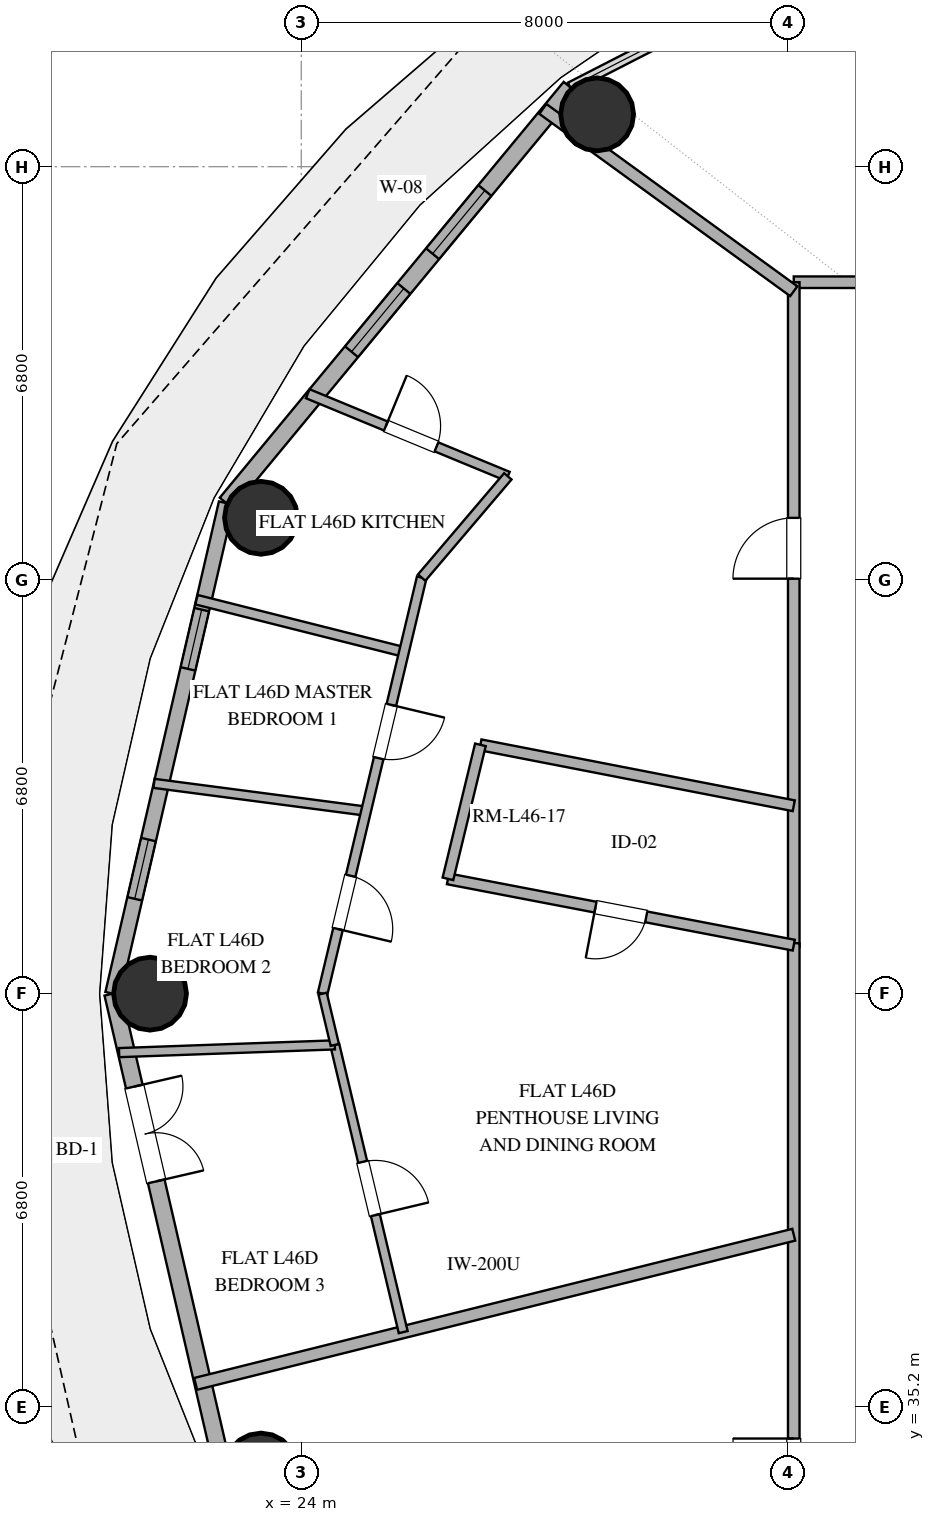
"""IFC4 building model, lengths in metres.
Left out: names, types, materials, properties, quantities, classifications, styles, units other than length and angle.
Written with IfcOpenShell. Run it as: python <this file> out.ifc"""

import sys

from ifc_helpers import new_model, si_unit, direction, frame, frame_2d, origin, origin_2d, place, context, subcontext, project, spatial, rectangle, hollow_circle, extrude, element, fill, save


model = new_model("IFC4")
c1 = context("Model", 3, precision=1e-05, world=origin(), true_north=direction((0.0, 1.0)))
c2 = subcontext(c1, "Body", "Model", "MODEL_VIEW")
j1 = project(units=[si_unit("LENGTHUNIT", "METRE"), si_unit("PLANEANGLEUNIT", "RADIAN")], contexts=[c1])
p1 = place(None, origin())
s1 = spatial("IfcSite", under=j1, at=p1, CompositionType="ELEMENT")
p2 = place(p1, origin())
s2 = spatial("IfcBuilding", under=s1, at=p2, CompositionType="ELEMENT")
p3 = place(p2, frame((0.0, 0.0, 183.0)))
s3 = spatial("IfcBuildingStorey", under=s2, at=p3, CompositionType="ELEMENT", Elevation=183.0)
for number, where, z_axis, x_axis in (
    (1, (28.866, 56.46, 0.0), (0.0, 0.0, 1.0), (1.0, 0.0, 0.0)),
    (2, (23.338, 49.826, 0.0), (0.0, 0.0, 1.0), (1.0, 0.0, 0.0)),
    (3, (21.513, 42.0, 0.0), (0.0, 0.0, 1.0), (1.0, 0.0, 0.0)),
    (4, (23.338, 34.174, 0.0), (0.0, 0.0, 1.0), (1.0, 0.0, 0.0)),
):
    element("IfcColumn", number, at=place(p3, frame(where, z_axis=z_axis, x_axis=x_axis)), inside=s3, PredefinedType="COLUMN", context=c2, shape_type="SweptSolid", body=[
        extrude(hollow_circle(Radius=0.6, WallThickness=0.032, at=origin_2d()), origin(), (0.0, 0.0, 1.0), 3.38),
    ])
p4 = place(p3, frame((28.424, 56.906, 0.0), z_axis=(0.0, 0.0, 1.0), x_axis=(-0.637333477683, -0.770588111915, 0.0)))
e5 = element("IfcWall", 5, at=p4, inside=s3, PredefinedType="SOLIDWALL", context=c2, shape_type="SweptSolid", body=[
    extrude(rectangle(XDim=8.875, YDim=0.28, at=frame_2d((4.438, 0.0))), origin(), (0.0, 0.0, 1.0), 3.38),
])
p5 = place(p4, frame((2.202, 0.0, 0.85)))
e6 = element("IfcOpeningElement", 6, at=p5, cuts=e5, PredefinedType="OPENING", context=c2, shape_type="SweptSolid", body=[
    extrude(rectangle(XDim=1.35, YDim=1.8, at=frame_2d((0.675, 0.9))), frame((0.0, 0.15, 0.0), z_axis=(0.0, -1.0, 0.0), x_axis=(1.0, 0.0, 0.0)), (0.0, 0.0, 1.0), 0.3),
])
p6 = place(p4, frame((4.294, 0.0, 0.85)))
e7 = element("IfcOpeningElement", 7, at=p6, cuts=e5, PredefinedType="OPENING", context=c2, shape_type="SweptSolid", body=[
    extrude(rectangle(XDim=1.35, YDim=1.8, at=frame_2d((0.675, 0.9))), frame((0.0, 0.15, 0.0), z_axis=(0.0, -1.0, 0.0), x_axis=(1.0, 0.0, 0.0)), (0.0, 0.0, 1.0), 0.3),
])
p7 = place(p3, frame((22.768, 50.067, 0.0), z_axis=(0.0, 0.0, 1.0), x_axis=(-0.225473184558, -0.974249374157, 0.0)))
e8 = element("IfcWall", 8, at=p7, inside=s3, PredefinedType="SOLIDWALL", context=c2, shape_type="SweptSolid", body=[
    extrude(rectangle(XDim=8.28, YDim=0.25, at=frame_2d((4.14, 0.0))), origin(), (0.0, 0.0, 1.0), 3.38),
])
p8 = place(p7, frame((1.798, 0.0, 1.42)))
e9 = element("IfcOpeningElement", 9, at=p8, cuts=e8, PredefinedType="OPENING", context=c2, shape_type="SweptSolid", body=[
    extrude(rectangle(XDim=1.0, YDim=1.05, at=frame_2d((0.5, 0.525))), frame((0.0, 0.135, 0.0), z_axis=(0.0, -1.0, 0.0), x_axis=(1.0, 0.0, 0.0)), (0.0, 0.0, 1.0), 0.27),
])
p9 = place(p7, frame((5.679, 0.0, 0.35)))
e10 = element("IfcOpeningElement", 10, at=p9, cuts=e8, PredefinedType="OPENING", context=c2, shape_type="SweptSolid", body=[
    extrude(rectangle(XDim=1.0, YDim=1.05, at=frame_2d((0.5, 0.525))), frame((0.0, 0.135, 0.0), z_axis=(0.0, -1.0, 0.0), x_axis=(1.0, 0.0, 0.0)), (0.0, 0.0, 1.0), 0.27),
])
p10 = place(p3, frame((20.901, 42.0, 0.0), z_axis=(0.0, 0.0, 1.0), x_axis=(0.225473184558, -0.974249374157, 0.0)))
e11 = element("IfcWall", 11, at=p10, inside=s3, PredefinedType="SOLIDWALL", context=c2, shape_type="SweptSolid", body=[
    extrude(rectangle(XDim=8.28, YDim=0.28, at=frame_2d((4.14, 0.0))), origin(), (0.0, 0.0, 1.0), 3.38),
])
p11 = place(p10, frame((1.568, 0.0, 0.0)))
e12 = element("IfcOpeningElement", 12, at=p11, cuts=e11, PredefinedType="OPENING", context=c2, shape_type="SweptSolid", body=[
    extrude(rectangle(XDim=1.6, YDim=2.25, at=frame_2d((0.8, 1.125))), frame((0.0, 0.15, 0.0), z_axis=(0.0, -1.0, 0.0), x_axis=(1.0, 0.0, 0.0)), (0.0, 0.0, 1.0), 0.3),
])
p12 = place(p3, frame((32.1, 53.7, 0.0), z_axis=(0.0, 0.0, 1.0), x_axis=(1.0, 0.0, 0.0)))
e13 = element("IfcWall", 13, at=p12, inside=s3, PredefinedType="PARTITIONING", context=c2, shape_type="SweptSolid", body=[
    extrude(rectangle(XDim=13.016, YDim=0.19, at=frame_2d((6.508, 0.0))), origin(), (0.0, 0.0, 1.0), 2.74),
])
p13 = place(p12, frame((4.199, 0.0, 0.0)))
e14 = element("IfcOpeningElement", 14, at=p13, cuts=e13, PredefinedType="OPENING", context=c2, shape_type="SweptSolid", body=[
    extrude(rectangle(XDim=1.0, YDim=2.2, at=frame_2d((0.5, 1.1))), frame((0.0, 0.105, 0.0), z_axis=(0.0, -1.0, 0.0), x_axis=(1.0, 0.0, 0.0)), (0.0, 0.0, 1.0), 0.21),
])
p14 = place(p3, frame((32.1, 42.765, 0.0), z_axis=(0.0, 0.0, 1.0), x_axis=(0.0, 1.0, 0.0)))
e15 = element("IfcWall", 15, at=p14, inside=s3, PredefinedType="PARTITIONING", context=c2, shape_type="SweptSolid", body=[
    extrude(rectangle(XDim=10.935, YDim=0.19, at=frame_2d((5.467, 0.0))), origin(), (0.0, 0.0, 1.0), 2.74),
])
p15 = place(p14, frame((6.06, 0.0, 0.0)))
e16 = element("IfcOpeningElement", 16, at=p15, cuts=e15, PredefinedType="OPENING", context=c2, shape_type="SweptSolid", body=[
    extrude(rectangle(XDim=1.0, YDim=2.2, at=frame_2d((0.5, 1.1))), frame((0.0, 0.105, 0.0), z_axis=(0.0, -1.0, 0.0), x_axis=(1.0, 0.0, 0.0)), (0.0, 0.0, 1.0), 0.21),
])
p16 = place(p3, frame((32.1, 30.3, 0.0), z_axis=(0.0, 0.0, 1.0), x_axis=(0.0, 1.0, 0.0)))
e17 = element("IfcWall", 17, at=p16, inside=s3, PredefinedType="PARTITIONING", context=c2, shape_type="SweptSolid", body=[
    extrude(rectangle(XDim=12.53, YDim=0.19, at=frame_2d((6.265, 0.0))), origin(), (0.0, 0.0, 1.0), 2.74),
])
p17 = place(p16, frame((3.384, 0.0, 0.0)))
e18 = element("IfcOpeningElement", 18, at=p17, cuts=e17, PredefinedType="OPENING", context=c2, shape_type="SweptSolid", body=[
    extrude(rectangle(XDim=1.0, YDim=2.2, at=frame_2d((0.5, 1.1))), frame((0.0, 0.105, 0.0), z_axis=(0.0, -1.0, 0.0), x_axis=(1.0, 0.0, 0.0)), (0.0, 0.0, 1.0), 0.21),
])
p18 = place(p3, frame((22.263, 35.583, 0.0), z_axis=(0.0, 0.0, 1.0), x_axis=(0.970298114693, 0.241912315983, 0.0)))
e19 = element("IfcWall", 19, at=p18, inside=s3, PredefinedType="PARTITIONING", context=c2, shape_type="SweptSolid", body=[
    extrude(rectangle(XDim=10.138, YDim=0.2, at=frame_2d((5.069, 0.0))), origin(), (0.0, 0.0, 1.0), 2.74),
])
p19 = place(p3, frame((32.1, 42.798, 0.0), z_axis=(0.0, 0.0, 1.0), x_axis=(-0.982107940525, 0.188318860333, 0.0)))
e20 = element("IfcWall", 20, at=p19, inside=s3, PredefinedType="PLUMBINGWALL", context=c2, shape_type="SweptSolid", body=[
    extrude(rectangle(XDim=5.791, YDim=0.18, at=frame_2d((2.896, 0.0))), origin(), (0.0, 0.0, 1.0), 2.74),
])
p20 = place(p19, frame((2.47, 0.0, 0.0)))
e21 = element("IfcOpeningElement", 21, at=p20, cuts=e20, PredefinedType="OPENING", context=c2, shape_type="SweptSolid", body=[
    extrude(rectangle(XDim=0.85, YDim=2.1, at=frame_2d((0.425, 1.05))), frame((0.0, 0.1, 0.0), z_axis=(0.0, -1.0, 0.0), x_axis=(1.0, 0.0, 0.0)), (0.0, 0.0, 1.0), 0.2),
])
p21 = place(p3, frame((26.947, 46.092, 0.0), z_axis=(0.0, 0.0, 1.0), x_axis=(0.981628698507, -0.190801200908, 0.0)))
e22 = element("IfcWall", 22, at=p21, inside=s3, PredefinedType="PLUMBINGWALL", context=c2, shape_type="SweptSolid", body=[
    extrude(rectangle(XDim=5.25, YDim=0.18, at=frame_2d((2.625, 0.0))), origin(), (0.0, 0.0, 1.0), 2.74),
])
p22 = place(p3, frame((32.1, 53.552, 0.0), z_axis=(0.0, 0.0, 1.0), x_axis=(-0.809023715391, 0.587776001496, 0.0)))
e23 = element("IfcWall", 23, at=p22, inside=s3, PredefinedType="PARTITIONING", context=c2, shape_type="SweptSolid", body=[
    extrude(rectangle(XDim=5.1, YDim=0.2, at=frame_2d((2.55, 0.0))), origin(), (0.0, 0.0, 1.0), 2.74),
])
p23 = place(p3, frame((24.552, 41.158, 0.0), z_axis=(0.0, 0.0, 1.0), x_axis=(0.231625058686, -0.972805135774, 0.0)))
e24 = element("IfcWall", 24, at=p23, inside=s3, PredefinedType="PARTITIONING", context=c2, shape_type="SweptSolid", body=[
    extrude(rectangle(XDim=4.856, YDim=0.15, at=frame_2d((2.428, 0.0))), origin(), (0.0, 0.0, 1.0), 2.74),
])
p24 = place(p23, frame((1.978, 0.0, 0.0)))
e25 = element("IfcOpeningElement", 25, at=p24, cuts=e24, PredefinedType="OPENING", context=c2, shape_type="SweptSolid", body=[
    extrude(rectangle(XDim=0.9, YDim=2.1, at=frame_2d((0.45, 1.05))), frame((0.0, 0.085, 0.0), z_axis=(0.0, -1.0, 0.0), x_axis=(1.0, 0.0, 0.0)), (0.0, 0.0, 1.0), 0.17),
])
p25 = place(p3, frame((24.107, 51.866, 0.0), z_axis=(0.0, 0.0, 1.0), x_axis=(0.924309814848, -0.381642982611, 0.0)))
e26 = element("IfcWall", 26, at=p25, inside=s3, PredefinedType="PLUMBINGWALL", context=c2, shape_type="SweptSolid", body=[
    extrude(rectangle(XDim=3.56, YDim=0.16, at=frame_2d((1.78, 0.0))), origin(), (0.0, 0.0, 1.0), 2.74),
])
p26 = place(p25, frame((1.39, 0.0, 0.0)))
e27 = element("IfcOpeningElement", 27, at=p26, cuts=e26, PredefinedType="OPENING", context=c2, shape_type="SweptSolid", body=[
    extrude(rectangle(XDim=0.9, YDim=2.1, at=frame_2d((0.45, 1.05))), frame((0.0, 0.09, 0.0), z_axis=(0.0, -1.0, 0.0), x_axis=(1.0, 0.0, 0.0)), (0.0, 0.0, 1.0), 0.18),
])
p27 = place(p3, frame((24.552, 41.158, 0.0), z_axis=(0.0, 0.0, 1.0), x_axis=(-0.999355385726, -0.035900042072, 0.0)))
e28 = element("IfcWall", 28, at=p27, inside=s3, PredefinedType="PARTITIONING", context=c2, shape_type="SweptSolid", body=[
    extrude(rectangle(XDim=3.55, YDim=0.15, at=frame_2d((1.775, 0.0))), origin(), (0.0, 0.0, 1.0), 2.74),
])
p28 = place(p3, frame((22.277, 48.479, 0.0), z_axis=(0.0, 0.0, 1.0), x_axis=(0.969720683394, -0.244216699259, 0.0)))
e29 = element("IfcWall", 29, at=p28, inside=s3, PredefinedType="PLUMBINGWALL", context=c2, shape_type="SweptSolid", body=[
    extrude(rectangle(XDim=3.519, YDim=0.16, at=frame_2d((1.759, 0.0))), origin(), (0.0, 0.0, 1.0), 2.74),
])
p29 = place(p3, frame((21.579, 45.458, 0.0), z_axis=(0.0, 0.0, 1.0), x_axis=(0.991540311483, -0.129799116729, 0.0)))
e30 = element("IfcWall", 30, at=p29, inside=s3, PredefinedType="PARTITIONING", context=c2, shape_type="SweptSolid", body=[
    extrude(rectangle(XDim=3.517, YDim=0.15, at=frame_2d((1.759, 0.0))), origin(), (0.0, 0.0, 1.0), 2.74),
])
p30 = place(p3, frame((25.981, 48.842, 0.0), z_axis=(0.0, 0.0, 1.0), x_axis=(-0.231658068135, -0.972797275627, 0.0)))
e31 = element("IfcWall", 31, at=p30, inside=s3, PredefinedType="PLUMBINGWALL", context=c2, shape_type="SweptSolid", body=[
    extrude(rectangle(XDim=7.034, YDim=0.16, at=frame_2d((3.517, 0.0))), origin(), (0.0, 0.0, 1.0), 2.74),
])
p31 = place(p30, frame((5.041, 0.0, 0.0)))
e32 = element("IfcOpeningElement", 32, at=p31, cuts=e31, PredefinedType="OPENING", context=c2, shape_type="SweptSolid", body=[
    extrude(rectangle(XDim=0.9, YDim=2.1, at=frame_2d((0.45, 1.05))), frame((0.0, 0.09, 0.0), z_axis=(0.0, -1.0, 0.0), x_axis=(1.0, 0.0, 0.0)), (0.0, 0.0, 1.0), 0.18),
])
p32 = place(p30, frame((2.153, 0.0, 0.0)))
e33 = element("IfcOpeningElement", 33, at=p32, cuts=e31, PredefinedType="OPENING", context=c2, shape_type="SweptSolid", body=[
    extrude(rectangle(XDim=0.9, YDim=2.1, at=frame_2d((0.45, 1.05))), frame((0.0, 0.09, 0.0), z_axis=(0.0, -1.0, 0.0), x_axis=(1.0, 0.0, 0.0)), (0.0, 0.0, 1.0), 0.18),
])
p33 = place(p3, frame((26.413, 43.888, 0.0), z_axis=(0.0, 0.0, 1.0), x_axis=(0.235461357856, 0.971883711643, 0.0)))
e34 = element("IfcWall", 34, at=p33, inside=s3, PredefinedType="PLUMBINGWALL", context=c2, shape_type="SweptSolid", body=[
    extrude(rectangle(XDim=2.268, YDim=0.18, at=frame_2d((1.134, 0.0))), origin(), (0.0, 0.0, 1.0), 2.74),
])
p34 = place(p3, frame((27.397, 50.508, 0.0), z_axis=(0.0, 0.0, 1.0), x_axis=(-0.647982213408, -0.761655467457, 0.0)))
e35 = element("IfcWall", 35, at=p34, inside=s3, PredefinedType="PLUMBINGWALL", context=c2, shape_type="SweptSolid", body=[
    extrude(rectangle(XDim=2.186, YDim=0.16, at=frame_2d((1.093, 0.0))), origin(), (0.0, 0.0, 1.0), 2.74),
])
p35 = place(p3, frame((24.351, 42.0, 0.0), z_axis=(0.0, 0.0, 1.0), x_axis=(0.231569683902, -0.972818318854, 0.0)))
e36 = element("IfcWall", 36, at=p35, inside=s3, PredefinedType="PARTITIONING", context=c2, shape_type="SweptSolid", body=[
    extrude(rectangle(XDim=0.865, YDim=0.14, at=frame_2d((0.433, 0.0))), origin(), (0.0, 0.0, 1.0), 2.74),
])
p36 = place(p5, origin())
e37 = element("IfcWindow", 37, at=p36, inside=s3, PartitioningType="SINGLE_PANEL", PredefinedType="WINDOW", context=c2, shape_type="SweptSolid", body=[
    extrude(rectangle(XDim=1.35, YDim=1.8, at=frame_2d((0.675, 0.9))), frame((0.0, 0.03, 0.0), z_axis=(0.0, -1.0, 0.0), x_axis=(1.0, 0.0, 0.0)), (0.0, 0.0, 1.0), 0.06),
])
fill(e6, e37)
p37 = place(p6, origin())
e38 = element("IfcWindow", 38, at=p37, inside=s3, PartitioningType="SINGLE_PANEL", PredefinedType="WINDOW", context=c2, shape_type="SweptSolid", body=[
    extrude(rectangle(XDim=1.35, YDim=1.8, at=frame_2d((0.675, 0.9))), frame((0.0, 0.03, 0.0), z_axis=(0.0, -1.0, 0.0), x_axis=(1.0, 0.0, 0.0)), (0.0, 0.0, 1.0), 0.06),
])
fill(e7, e38)
p38 = place(p11, origin())
e39 = element("IfcDoor", 39, at=p38, inside=s3, OperationType="DOUBLE_DOOR_SINGLE_SWING", PredefinedType="DOOR", context=c2, shape_type="SweptSolid", body=[
    extrude(rectangle(XDim=1.6, YDim=2.25, at=frame_2d((0.8, 1.125))), frame((0.0, 0.025, 0.0), z_axis=(0.0, -1.0, 0.0), x_axis=(1.0, 0.0, 0.0)), (0.0, 0.0, 1.0), 0.05),
])
fill(e12, e39)
p39 = place(p8, origin())
e40 = element("IfcWindow", 40, at=p39, inside=s3, PartitioningType="SINGLE_PANEL", PredefinedType="WINDOW", context=c2, shape_type="SweptSolid", body=[
    extrude(rectangle(XDim=1.0, YDim=1.05, at=frame_2d((0.5, 0.525))), frame((0.0, 0.03, 0.0), z_axis=(0.0, -1.0, 0.0), x_axis=(1.0, 0.0, 0.0)), (0.0, 0.0, 1.0), 0.06),
])
fill(e9, e40)
p40 = place(p9, origin())
e41 = element("IfcWindow", 41, at=p40, inside=s3, PartitioningType="SINGLE_PANEL", PredefinedType="WINDOW", context=c2, shape_type="SweptSolid", body=[
    extrude(rectangle(XDim=1.0, YDim=1.05, at=frame_2d((0.5, 0.525))), frame((0.0, 0.03, 0.0), z_axis=(0.0, -1.0, 0.0), x_axis=(1.0, 0.0, 0.0)), (0.0, 0.0, 1.0), 0.06),
])
fill(e10, e41)
p41 = place(p15, origin())
e42 = element("IfcDoor", 42, at=p41, inside=s3, OperationType="SINGLE_SWING_LEFT", PredefinedType="DOOR", context=c2, shape_type="SweptSolid", body=[
    extrude(rectangle(XDim=1.0, YDim=2.2, at=frame_2d((0.5, 1.1))), frame((0.0, 0.025, 0.0), z_axis=(0.0, -1.0, 0.0), x_axis=(1.0, 0.0, 0.0)), (0.0, 0.0, 1.0), 0.05),
])
fill(e16, e42)
p42 = place(p17, origin())
e43 = element("IfcDoor", 43, at=p42, inside=s3, OperationType="SINGLE_SWING_RIGHT", PredefinedType="DOOR", context=c2, shape_type="SweptSolid", body=[
    extrude(rectangle(XDim=1.0, YDim=2.2, at=frame_2d((0.5, 1.1))), frame((0.0, 0.025, 0.0), z_axis=(0.0, -1.0, 0.0), x_axis=(1.0, 0.0, 0.0)), (0.0, 0.0, 1.0), 0.05),
])
fill(e18, e43)
p43 = place(p20, origin())
e44 = element("IfcDoor", 44, at=p43, inside=s3, OperationType="SINGLE_SWING_RIGHT", PredefinedType="DOOR", context=c2, shape_type="SweptSolid", body=[
    extrude(rectangle(XDim=0.85, YDim=2.1, at=frame_2d((0.425, 1.05))), frame((0.0, 0.025, 0.0), z_axis=(0.0, -1.0, 0.0), x_axis=(1.0, 0.0, 0.0)), (0.0, 0.0, 1.0), 0.05),
])
fill(e21, e44)
p44 = place(p24, origin())
e45 = element("IfcDoor", 45, at=p44, inside=s3, OperationType="SINGLE_SWING_RIGHT", PredefinedType="DOOR", context=c2, shape_type="SweptSolid", body=[
    extrude(rectangle(XDim=0.9, YDim=2.1, at=frame_2d((0.45, 1.05))), frame((0.0, 0.025, 0.0), z_axis=(0.0, -1.0, 0.0), x_axis=(1.0, 0.0, 0.0)), (0.0, 0.0, 1.0), 0.05),
])
fill(e25, e45)
p45 = place(p26, origin())
e46 = element("IfcDoor", 46, at=p45, inside=s3, OperationType="SINGLE_SWING_LEFT", PredefinedType="DOOR", context=c2, shape_type="SweptSolid", body=[
    extrude(rectangle(XDim=0.9, YDim=2.1, at=frame_2d((0.45, 1.05))), frame((0.0, 0.025, 0.0), z_axis=(0.0, -1.0, 0.0), x_axis=(1.0, 0.0, 0.0)), (0.0, 0.0, 1.0), 0.05),
])
fill(e27, e46)
p46 = place(p31, origin())
e47 = element("IfcDoor", 47, at=p46, inside=s3, OperationType="SINGLE_SWING_RIGHT", PredefinedType="DOOR", context=c2, shape_type="SweptSolid", body=[
    extrude(rectangle(XDim=0.9, YDim=2.1, at=frame_2d((0.45, 1.05))), frame((0.0, 0.025, 0.0), z_axis=(0.0, -1.0, 0.0), x_axis=(1.0, 0.0, 0.0)), (0.0, 0.0, 1.0), 0.05),
])
fill(e32, e47)
p47 = place(p32, origin())
e48 = element("IfcDoor", 48, at=p47, inside=s3, OperationType="SINGLE_SWING_LEFT", PredefinedType="DOOR", context=c2, shape_type="SweptSolid", body=[
    extrude(rectangle(XDim=0.9, YDim=2.1, at=frame_2d((0.45, 1.05))), frame((0.0, 0.025, 0.0), z_axis=(0.0, -1.0, 0.0), x_axis=(1.0, 0.0, 0.0)), (0.0, 0.0, 1.0), 0.05),
])
fill(e33, e48)
save(model, sys.argv[1])
